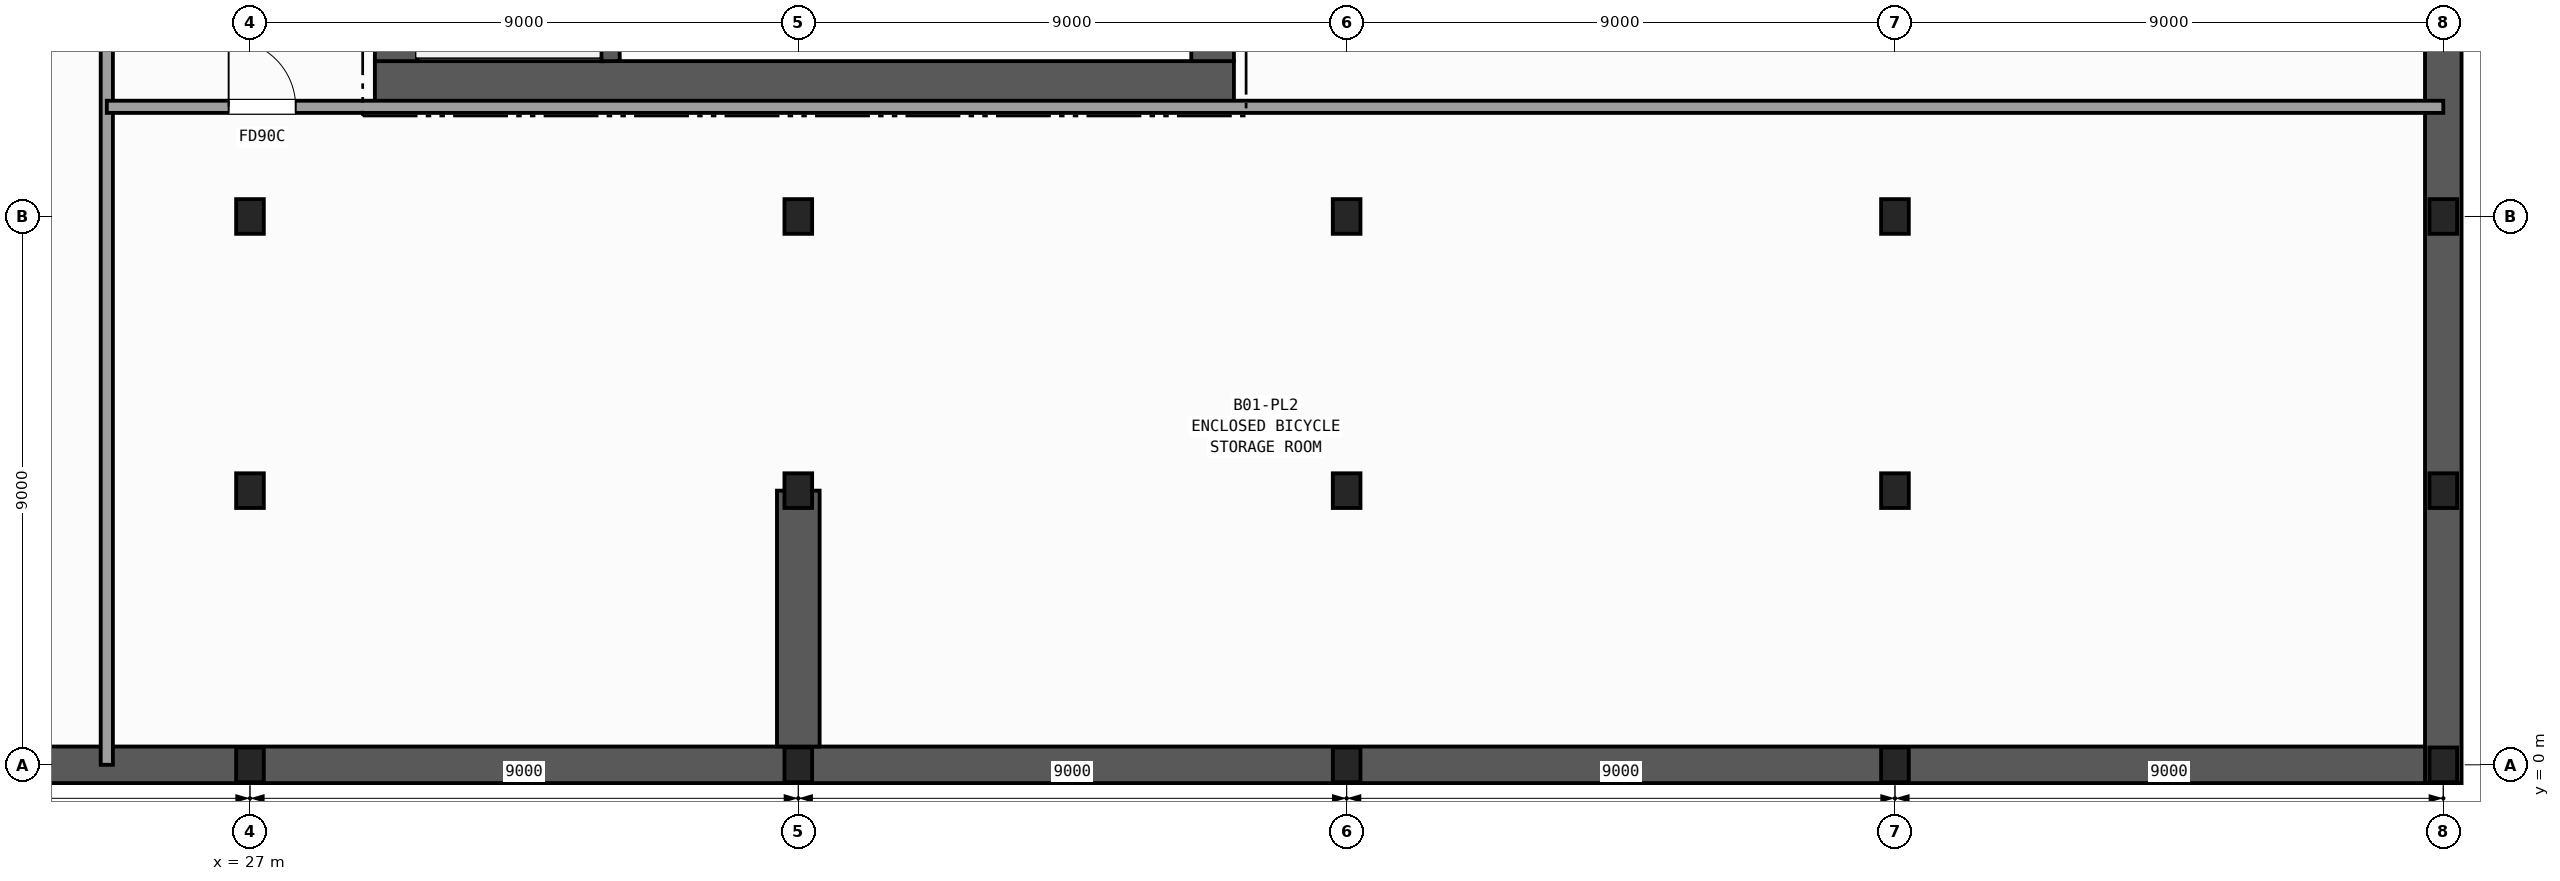
"""IFC4 building model, lengths in metres.
Left out: names, types, materials, properties, quantities, classifications, styles, units other than length and angle.
Written with IfcOpenShell. Run it as: python <this file> out.ifc"""

import sys

from ifc_helpers import new_model, si_unit, direction, frame, frame_2d, origin, origin_2d, place, context, subcontext, project, spatial, rectangle, i_section, extrude, element, fill, save


model = new_model("IFC4")
c1 = context("Model", 3, precision=1e-05, world=origin(), true_north=direction((0.0, 1.0)))
c2 = subcontext(c1, "Body", "Model", "MODEL_VIEW")
j1 = project(units=[si_unit("LENGTHUNIT", "METRE"), si_unit("PLANEANGLEUNIT", "RADIAN")], contexts=[c1])
p1 = place(None, origin())
s1 = spatial("IfcSite", under=j1, at=p1, CompositionType="ELEMENT")
p2 = place(p1, origin())
s2 = spatial("IfcBuilding", under=s1, at=p2, CompositionType="ELEMENT")
p3 = place(p2, frame((0.0, 0.0, -4.5)))
s3 = spatial("IfcBuildingStorey", under=s2, at=p3, CompositionType="ELEMENT", Elevation=-4.5)
for number, where, z_axis, x_axis in (
    (1, (27.0, 0.0, 0.0), (0.0, 0.0, 1.0), (1.0, 0.0, 0.0)),
    (2, (27.0, 9.0, 0.0), (0.0, 0.0, 1.0), (1.0, 0.0, 0.0)),
    (3, (36.0, 0.0, 0.0), (0.0, 0.0, 1.0), (1.0, 0.0, 0.0)),
    (4, (36.0, 9.0, 0.0), (0.0, 0.0, 1.0), (1.0, 0.0, 0.0)),
    (5, (45.0, 0.0, 0.0), (0.0, 0.0, 1.0), (1.0, 0.0, 0.0)),
    (6, (45.0, 9.0, 0.0), (0.0, 0.0, 1.0), (1.0, 0.0, 0.0)),
    (7, (54.0, 0.0, 0.0), (0.0, 0.0, 1.0), (1.0, 0.0, 0.0)),
    (8, (54.0, 9.0, 0.0), (0.0, 0.0, 1.0), (1.0, 0.0, 0.0)),
    (9, (63.0, 0.0, 0.0), (0.0, 0.0, 1.0), (1.0, 0.0, 0.0)),
    (10, (63.0, 9.0, 0.0), (0.0, 0.0, 1.0), (1.0, 0.0, 0.0)),
    (11, (27.0, 4.5, 0.0), (0.0, 0.0, 1.0), (1.0, 0.0, 0.0)),
    (12, (36.0, 4.5, 0.0), (0.0, 0.0, 1.0), (1.0, 0.0, 0.0)),
    (13, (45.0, 4.5, 0.0), (0.0, 0.0, 1.0), (1.0, 0.0, 0.0)),
    (14, (54.0, 4.5, 0.0), (0.0, 0.0, 1.0), (1.0, 0.0, 0.0)),
    (15, (63.0, 4.5, 0.0), (0.0, 0.0, 1.0), (1.0, 0.0, 0.0)),
):
    element("IfcColumn", number, at=place(p3, frame(where, z_axis=z_axis, x_axis=x_axis)), inside=s3, PredefinedType="COLUMN", context=c2, shape_type="SweptSolid", body=[
        extrude(i_section(OverallWidth=0.454, OverallDepth=0.569, WebThickness=0.078, FlangeThickness=0.125, FilletRadius=0.015, at=origin_2d()), origin(), (0.0, 0.0, 1.0), 4.5),
    ])
p4 = place(p3, frame((63.0, 54.3, 0.0), z_axis=(0.0, 0.0, 1.0), x_axis=(0.0, -1.0, 0.0)))
e16 = element("IfcWall", 16, at=p4, inside=s3, PredefinedType="SOLIDWALL", context=c2, shape_type="SweptSolid", body=[
    extrude(rectangle(XDim=54.6, YDim=0.6, at=frame_2d((27.3, 0.0))), origin(), (0.0, 0.0, 1.0), 4.18),
])
p5 = place(p3, frame((62.7, 0.0, 0.0), z_axis=(0.0, 0.0, 1.0), x_axis=(-1.0, 0.0, 0.0)))
e17 = element("IfcWall", 17, at=p5, inside=s3, PredefinedType="SOLIDWALL", context=c2, shape_type="SweptSolid", body=[
    extrude(rectangle(XDim=62.4, YDim=0.6, at=frame_2d((31.2, 0.0))), origin(), (0.0, 0.0, 1.0), 4.18),
])
p6 = place(p3, frame((36.0, 0.3, 0.0), z_axis=(0.0, 0.0, 1.0), x_axis=(0.0, 1.0, 0.0)))
e18 = element("IfcWall", 18, at=p6, inside=s3, PredefinedType="SHEAR", context=c2, shape_type="SweptSolid", body=[
    extrude(rectangle(XDim=4.2, YDim=0.7, at=frame_2d((2.1, 0.0))), origin(), (0.0, 0.0, 1.0), 4.18),
])
p7 = place(p3, frame((29.05, 11.2, 0.0), z_axis=(0.0, 0.0, 1.0), x_axis=(1.0, 0.0, 0.0)))
e19 = element("IfcWall", 19, at=p7, inside=s3, PredefinedType="SHEAR", context=c2, shape_type="SweptSolid", body=[
    extrude(rectangle(XDim=14.1, YDim=0.7, at=frame_2d((7.05, 0.0))), origin(), (0.0, 0.0, 1.0), 4.18),
])
p8 = place(p3, frame((29.4, 24.25, 0.0), z_axis=(0.0, 0.0, 1.0), x_axis=(0.0, -1.0, 0.0)))
e20 = element("IfcWall", 20, at=p8, inside=s3, PredefinedType="SHEAR", context=c2, shape_type="SweptSolid", body=[
    extrude(rectangle(XDim=12.7, YDim=0.7, at=frame_2d((6.35, 0.0))), origin(), (0.0, 0.0, 1.0), 4.18),
])
p9 = place(p8, frame((1.35, 0.0, 0.0)))
e21 = element("IfcOpeningElement", 21, at=p9, cuts=e20, PredefinedType="OPENING", context=c2, shape_type="SweptSolid", body=[
    extrude(rectangle(XDim=1.35, YDim=2.15, at=frame_2d((0.675, 1.075))), frame((0.0, 0.36, 0.0), z_axis=(0.0, -1.0, 0.0), x_axis=(1.0, 0.0, 0.0)), (0.0, 0.0, 1.0), 0.72),
])
p10 = place(p3, frame((42.8, 11.55, 0.0), z_axis=(0.0, 0.0, 1.0), x_axis=(0.0, 1.0, 0.0)))
e22 = element("IfcWall", 22, at=p10, inside=s3, PredefinedType="SHEAR", context=c2, shape_type="SweptSolid", body=[
    extrude(rectangle(XDim=12.7, YDim=0.7, at=frame_2d((6.35, 0.0))), origin(), (0.0, 0.0, 1.0), 4.18),
])
p11 = place(p3, frame((32.92, 11.55, 0.0), z_axis=(0.0, 0.0, 1.0), x_axis=(-0.01331804616, 0.99991131089, 0.0)))
e23 = element("IfcWall", 23, at=p11, inside=s3, PredefinedType="SHEAR", context=c2, shape_type="SweptSolid", body=[
    extrude(rectangle(XDim=9.001, YDim=0.3, at=frame_2d((4.5, 0.0))), origin(), (0.0, 0.0, 1.0), 4.18),
])
p12 = place(p3, frame((24.65, 0.0, 0.0), z_axis=(0.0, 0.0, 1.0), x_axis=(0.0, 1.0, 0.0)))
e24 = element("IfcWall", 24, at=p12, inside=s3, PredefinedType="PARTITIONING", context=c2, shape_type="SweptSolid", body=[
    extrude(rectangle(XDim=28.2, YDim=0.2, at=frame_2d((14.1, 0.0))), origin(), (0.0, 0.0, 1.0), 3.233),
])
p13 = place(p12, frame((13.0, 0.0, 0.0)))
e25 = element("IfcOpeningElement", 25, at=p13, cuts=e24, PredefinedType="OPENING", context=c2, shape_type="SweptSolid", body=[
    extrude(rectangle(XDim=1.1, YDim=2.15, at=frame_2d((0.55, 1.075))), frame((0.0, 0.11, 0.0), z_axis=(0.0, -1.0, 0.0), x_axis=(1.0, 0.0, 0.0)), (0.0, 0.0, 1.0), 0.22),
])
p14 = place(p3, frame((24.65, 10.8, 0.0), z_axis=(0.0, 0.0, 1.0), x_axis=(1.0, 0.0, 0.0)))
e26 = element("IfcWall", 26, at=p14, inside=s3, PredefinedType="PARTITIONING", context=c2, shape_type="SweptSolid", body=[
    extrude(rectangle(XDim=38.35, YDim=0.2, at=frame_2d((19.175, 0.0))), origin(), (0.0, 0.0, 1.0), 3.305),
])
p15 = place(p14, frame((2.0, 0.0, 0.0)))
e27 = element("IfcOpeningElement", 27, at=p15, cuts=e26, PredefinedType="OPENING", context=c2, shape_type="SweptSolid", body=[
    extrude(rectangle(XDim=1.1, YDim=2.15, at=frame_2d((0.55, 1.075))), frame((0.0, 0.11, 0.0), z_axis=(0.0, -1.0, 0.0), x_axis=(1.0, 0.0, 0.0)), (0.0, 0.0, 1.0), 0.22),
])
p16 = place(p15, origin())
e28 = element("IfcDoor", 28, at=p16, inside=s3, OperationType="SINGLE_SWING_LEFT", PredefinedType="DOOR", context=c2, shape_type="SweptSolid", body=[
    extrude(rectangle(XDim=1.1, YDim=2.15, at=frame_2d((0.55, 1.075))), frame((0.0, 0.025, 0.0), z_axis=(0.0, -1.0, 0.0), x_axis=(1.0, 0.0, 0.0)), (0.0, 0.0, 1.0), 0.05),
])
fill(e27, e28)
save(model, sys.argv[1])
